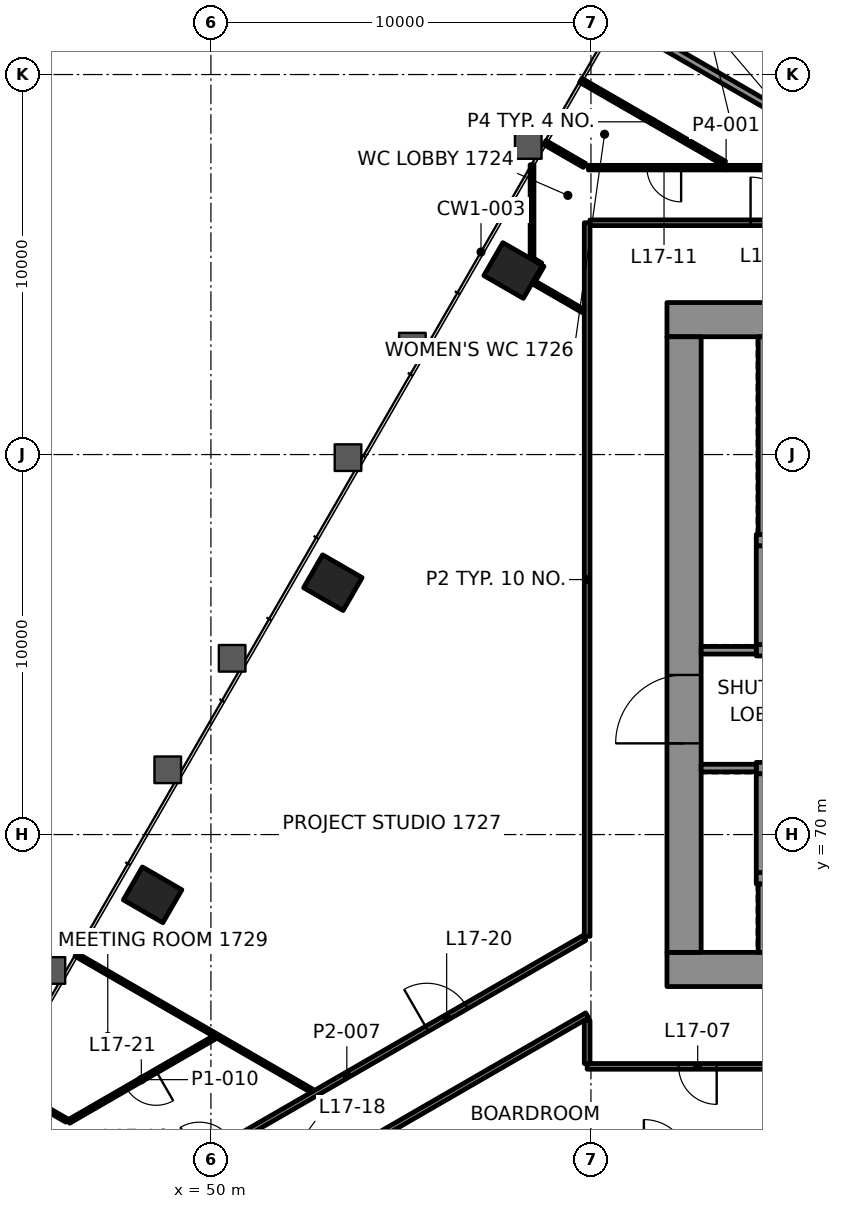
"""IFC4 building model, lengths in metres.
Left out: names, types, materials, properties, quantities, classifications, styles, units other than length and angle.
Written with IfcOpenShell. Run it as: python <this file> out.ifc"""

import sys

from ifc_helpers import new_model, si_unit, direction, frame, frame_2d, origin, origin_2d, place, context, subcontext, project, spatial, rectangle, extrude, element, fill, save


model = new_model("IFC4")
c1 = context("Model", 3, precision=1e-05, world=origin(), true_north=direction((0.0, 1.0)))
c2 = subcontext(c1, "Body", "Model", "MODEL_VIEW")
j1 = project(units=[si_unit("LENGTHUNIT", "METRE"), si_unit("PLANEANGLEUNIT", "RADIAN")], contexts=[c1])
p1 = place(None, origin())
s1 = spatial("IfcSite", under=j1, at=p1, CompositionType="ELEMENT")
p2 = place(p1, origin())
s2 = spatial("IfcBuilding", under=s1, at=p2, CompositionType="ELEMENT")
p3 = place(p2, frame((0.0, 0.0, 77.8)))
s3 = spatial("IfcBuildingStorey", under=s2, at=p3, CompositionType="ELEMENT", Elevation=77.8)
for number, where, z_axis, x_axis in (
    (1, (57.951, 84.843, -0.0), (0.0, 0.0, 1.0), (-0.5, -0.866, 0.0)),
    (2, (53.209, 76.628, -0.0), (0.0, 0.0, 1.0), (-0.5, -0.866, 0.0)),
    (3, (48.466, 68.414, -0.0), (0.0, 0.0, 1.0), (-0.5, -0.866, 0.0)),
):
    element("IfcColumn", number, at=place(p3, frame(where, z_axis=z_axis, x_axis=x_axis)), inside=s3, PredefinedType="COLUMN", context=c2, shape_type="SweptSolid", body=[
        extrude(rectangle(XDim=1.0, YDim=1.2, at=origin_2d()), origin(), (0.0, 0.0, 1.0), 4.2),
    ])
p4 = place(p3, frame((62.0, 66.45, 0.0), z_axis=(0.0, 0.0, 1.0), x_axis=(1.0, 0.0, 0.0)))
e4 = element("IfcWall", 4, at=p4, inside=s3, PredefinedType="SHEAR", context=c2, shape_type="SweptSolid", body=[
    extrude(rectangle(XDim=26.0, YDim=0.9, at=frame_2d((13.0, 0.0))), origin(), (0.0, 0.0, 1.0), 4.0),
])
p5 = place(p4, frame((3.45, 0.0, 0.0)))
e5 = element("IfcOpeningElement", 5, at=p5, cuts=e4, PredefinedType="OPENING", context=c2, shape_type="SweptSolid", body=[
    extrude(rectangle(XDim=0.9, YDim=2.1, at=frame_2d((0.45, 1.05))), frame((0.0, 0.46, 0.0), z_axis=(0.0, -1.0, 0.0), x_axis=(1.0, 0.0, 0.0)), (0.0, 0.0, 1.0), 0.92),
])
p6 = place(p4, frame((5.637, 0.0, 0.0)))
e6 = element("IfcOpeningElement", 6, at=p6, cuts=e4, PredefinedType="OPENING", context=c2, shape_type="SweptSolid", body=[
    extrude(rectangle(XDim=0.9, YDim=2.1, at=frame_2d((0.45, 1.05))), frame((0.0, 0.46, 0.0), z_axis=(0.0, -1.0, 0.0), x_axis=(1.0, 0.0, 0.0)), (0.0, 0.0, 1.0), 0.92),
])
p7 = place(p4, frame((7.212, 0.0, 0.0)))
e7 = element("IfcOpeningElement", 7, at=p7, cuts=e4, PredefinedType="OPENING", context=c2, shape_type="SweptSolid", body=[
    extrude(rectangle(XDim=0.9, YDim=2.1, at=frame_2d((0.45, 1.05))), frame((0.0, 0.46, 0.0), z_axis=(0.0, -1.0, 0.0), x_axis=(1.0, 0.0, 0.0)), (0.0, 0.0, 1.0), 0.92),
])
p8 = place(p4, frame((8.999, 0.0, 0.0)))
e8 = element("IfcOpeningElement", 8, at=p8, cuts=e4, PredefinedType="OPENING", context=c2, shape_type="SweptSolid", body=[
    extrude(rectangle(XDim=0.9, YDim=2.1, at=frame_2d((0.45, 1.05))), frame((0.0, 0.46, 0.0), z_axis=(0.0, -1.0, 0.0), x_axis=(1.0, 0.0, 0.0)), (0.0, 0.0, 1.0), 0.92),
])
p9 = place(p4, frame((17.324, 0.0, 0.0)))
e9 = element("IfcOpeningElement", 9, at=p9, cuts=e4, PredefinedType="OPENING", context=c2, shape_type="SweptSolid", body=[
    extrude(rectangle(XDim=0.9, YDim=2.1, at=frame_2d((0.45, 1.05))), frame((0.0, 0.46, 0.0), z_axis=(0.0, -1.0, 0.0), x_axis=(1.0, 0.0, 0.0)), (0.0, 0.0, 1.0), 0.92),
])
p10 = place(p3, frame((62.0, 83.55, 0.0), z_axis=(0.0, 0.0, 1.0), x_axis=(1.0, 0.0, 0.0)))
e10 = element("IfcWall", 10, at=p10, inside=s3, PredefinedType="SHEAR", context=c2, shape_type="SweptSolid", body=[
    extrude(rectangle(XDim=26.0, YDim=0.9, at=frame_2d((13.0, 0.0))), origin(), (0.0, 0.0, 1.0), 4.0),
])
p11 = place(p10, frame((5.695, 0.0, 0.0)))
e11 = element("IfcOpeningElement", 11, at=p11, cuts=e10, PredefinedType="OPENING", context=c2, shape_type="SweptSolid", body=[
    extrude(rectangle(XDim=1.0, YDim=2.1, at=frame_2d((0.5, 1.05))), frame((0.0, 0.46, 0.0), z_axis=(0.0, -1.0, 0.0), x_axis=(1.0, 0.0, 0.0)), (0.0, 0.0, 1.0), 0.92),
])
p12 = place(p10, frame((19.505, 0.0, 0.0)))
e12 = element("IfcOpeningElement", 12, at=p12, cuts=e10, PredefinedType="OPENING", context=c2, shape_type="SweptSolid", body=[
    extrude(rectangle(XDim=1.0, YDim=2.1, at=frame_2d((0.5, 1.05))), frame((0.0, 0.46, 0.0), z_axis=(0.0, -1.0, 0.0), x_axis=(1.0, 0.0, 0.0)), (0.0, 0.0, 1.0), 0.92),
])
p13 = place(p10, frame((3.45, 0.0, 0.0)))
e13 = element("IfcOpeningElement", 13, at=p13, cuts=e10, PredefinedType="OPENING", context=c2, shape_type="SweptSolid", body=[
    extrude(rectangle(XDim=0.9, YDim=2.1, at=frame_2d((0.45, 1.05))), frame((0.0, 0.46, 0.0), z_axis=(0.0, -1.0, 0.0), x_axis=(1.0, 0.0, 0.0)), (0.0, 0.0, 1.0), 0.92),
])
p14 = place(p10, frame((12.65, 0.0, 0.0)))
e14 = element("IfcOpeningElement", 14, at=p14, cuts=e10, PredefinedType="OPENING", context=c2, shape_type="SweptSolid", body=[
    extrude(rectangle(XDim=0.9, YDim=2.1, at=frame_2d((0.45, 1.05))), frame((0.0, 0.46, 0.0), z_axis=(0.0, -1.0, 0.0), x_axis=(1.0, 0.0, 0.0)), (0.0, 0.0, 1.0), 0.92),
])
p15 = place(p10, frame((22.55, 0.0, 0.0)))
e15 = element("IfcOpeningElement", 15, at=p15, cuts=e10, PredefinedType="OPENING", context=c2, shape_type="SweptSolid", body=[
    extrude(rectangle(XDim=0.9, YDim=2.1, at=frame_2d((0.45, 1.05))), frame((0.0, 0.46, 0.0), z_axis=(0.0, -1.0, 0.0), x_axis=(1.0, 0.0, 0.0)), (0.0, 0.0, 1.0), 0.92),
])
p16 = place(p3, frame((62.45, 66.9, 0.0), z_axis=(0.0, 0.0, 1.0), x_axis=(0.0, 1.0, 0.0)))
e16 = element("IfcWall", 16, at=p16, inside=s3, PredefinedType="SHEAR", context=c2, shape_type="SweptSolid", body=[
    extrude(rectangle(XDim=16.2, YDim=0.9, at=frame_2d((8.1, 0.0))), origin(), (0.0, 0.0, 1.0), 4.0),
])
p17 = place(p16, frame((5.5, 0.0, 0.0)))
e17 = element("IfcOpeningElement", 17, at=p17, cuts=e16, PredefinedType="OPENING", context=c2, shape_type="SweptSolid", body=[
    extrude(rectangle(XDim=1.8, YDim=2.1, at=frame_2d((0.9, 1.05))), frame((0.0, 0.46, 0.0), z_axis=(0.0, -1.0, 0.0), x_axis=(1.0, 0.0, 0.0)), (0.0, 0.0, 1.0), 0.92),
])
for number, where, z_axis, x_axis in (
    (18, (64.35, 68.85, 0.0), (0.0, 0.0, 1.0), (1.0, 0.0, 0.0)),
    (19, (64.35, 71.75, 0.0), (0.0, 0.0, 1.0), (1.0, 0.0, 0.0)),
    (20, (64.35, 74.85, 0.0), (0.0, 0.0, 1.0), (1.0, 0.0, 0.0)),
):
    element("IfcWall", number, at=place(p3, frame(where, z_axis=z_axis, x_axis=x_axis)), inside=s3, PredefinedType="SHEAR", context=c2, shape_type="SweptSolid", body=[
        extrude(rectangle(XDim=3.1, YDim=0.3, at=frame_2d((1.55, 0.0))), origin(), (0.0, 0.0, 1.0), 4.0),
    ])
for number, where, z_axis, x_axis in (
    (21, (64.5, 69.0, 0.0), (0.0, 0.0, 1.0), (0.0, 1.0, 0.0)),
    (22, (64.5, 75.0, 0.0), (0.0, 0.0, 1.0), (0.0, 1.0, 0.0)),
):
    element("IfcWall", number, at=place(p3, frame(where, z_axis=z_axis, x_axis=x_axis)), inside=s3, PredefinedType="SHEAR", context=c2, shape_type="SweptSolid", body=[
        extrude(rectangle(XDim=2.6, YDim=0.3, at=frame_2d((1.3, 0.0))), origin(), (0.0, 0.0, 1.0), 4.0),
    ])
p18 = place(p3, frame((64.35, 77.75, 0.0), z_axis=(0.0, 0.0, 1.0), x_axis=(1.0, 0.0, 0.0)))
e23 = element("IfcWall", 23, at=p18, inside=s3, PredefinedType="SHEAR", context=c2, shape_type="SweptSolid", body=[
    extrude(rectangle(XDim=22.75, YDim=0.3, at=frame_2d((11.375, 0.0))), origin(), (0.0, 0.0, 1.0), 4.0),
])
p19 = place(p18, frame((3.345, 0.0, 0.0)))
e24 = element("IfcOpeningElement", 24, at=p19, cuts=e23, PredefinedType="OPENING", context=c2, shape_type="SweptSolid", body=[
    extrude(rectangle(XDim=1.0, YDim=2.1, at=frame_2d((0.5, 1.05))), frame((0.0, 0.16, 0.0), z_axis=(0.0, -1.0, 0.0), x_axis=(1.0, 0.0, 0.0)), (0.0, 0.0, 1.0), 0.32),
])
p20 = place(p3, frame((90.099, 63.9, 0.0), z_axis=(0.0, 0.0, 1.0), x_axis=(-1.0, 0.0, 0.0)))
e25 = element("IfcWall", 25, at=p20, inside=s3, PredefinedType="PARTITIONING", context=c2, shape_type="SweptSolid", body=[
    extrude(rectangle(XDim=30.199, YDim=0.15, at=frame_2d((15.1, 0.0))), origin(), (0.0, 0.0, 1.0), 3.4),
])
p21 = place(p20, frame((2.309, 0.0, 0.0)))
e26 = element("IfcOpeningElement", 26, at=p21, cuts=e25, PredefinedType="OPENING", context=c2, shape_type="SweptSolid", body=[
    extrude(rectangle(XDim=1.2, YDim=2.1, at=frame_2d((0.6, 1.05))), frame((0.0, 0.085, 0.0), z_axis=(0.0, -1.0, 0.0), x_axis=(1.0, 0.0, 0.0)), (0.0, 0.0, 1.0), 0.17),
])
p22 = place(p20, frame((14.599, 0.0, 0.0)))
e27 = element("IfcOpeningElement", 27, at=p22, cuts=e25, PredefinedType="OPENING", context=c2, shape_type="SweptSolid", body=[
    extrude(rectangle(XDim=1.0, YDim=2.1, at=frame_2d((0.5, 1.05))), frame((0.0, 0.085, 0.0), z_axis=(0.0, -1.0, 0.0), x_axis=(1.0, 0.0, 0.0)), (0.0, 0.0, 1.0), 0.17),
])
p23 = place(p20, frame((26.791, 0.0, 0.0)))
e28 = element("IfcOpeningElement", 28, at=p23, cuts=e25, PredefinedType="OPENING", context=c2, shape_type="SweptSolid", body=[
    extrude(rectangle(XDim=1.0, YDim=2.1, at=frame_2d((0.5, 1.05))), frame((0.0, 0.085, 0.0), z_axis=(0.0, -1.0, 0.0), x_axis=(1.0, 0.0, 0.0)), (0.0, 0.0, 1.0), 0.17),
])
p24 = place(p3, frame((59.976, 86.1, 0.0), z_axis=(0.0, 0.0, 1.0), x_axis=(1.0, 0.0, 0.0)))
e29 = element("IfcWall", 29, at=p24, inside=s3, PredefinedType="PARTITIONING", context=c2, shape_type="SweptSolid", body=[
    extrude(rectangle(XDim=9.649, YDim=0.15, at=frame_2d((4.825, 0.0))), origin(), (0.0, 0.0, 1.0), 3.4),
])
p25 = place(p24, frame((4.225, 0.0, 0.0)))
e30 = element("IfcOpeningElement", 30, at=p25, cuts=e29, PredefinedType="OPENING", context=c2, shape_type="SweptSolid", body=[
    extrude(rectangle(XDim=1.2, YDim=2.1, at=frame_2d((0.6, 1.05))), frame((0.0, 0.085, 0.0), z_axis=(0.0, -1.0, 0.0), x_axis=(1.0, 0.0, 0.0)), (0.0, 0.0, 1.0), 0.17),
])
p26 = place(p3, frame((67.181, 87.55, 0.0), z_axis=(0.0, 0.0, 1.0), x_axis=(-1.0, 0.0, 0.0)))
e31 = element("IfcWall", 31, at=p26, inside=s3, PredefinedType="PARTITIONING", context=c2, shape_type="SweptSolid", body=[
    extrude(rectangle(XDim=7.249, YDim=0.12, at=frame_2d((3.625, 0.0))), origin(), (0.0, 0.0, 1.0), 3.4),
])
p27 = place(p26, frame((1.388, 0.0, 0.0)))
e32 = element("IfcOpeningElement", 32, at=p27, cuts=e31, PredefinedType="OPENING", context=c2, shape_type="SweptSolid", body=[
    extrude(rectangle(XDim=0.9, YDim=2.1, at=frame_2d((0.45, 1.05))), frame((0.0, 0.07, 0.0), z_axis=(0.0, -1.0, 0.0), x_axis=(1.0, 0.0, 0.0)), (0.0, 0.0, 1.0), 0.14),
])
p28 = place(p26, frame((4.807, 0.0, 0.0)))
e33 = element("IfcOpeningElement", 33, at=p28, cuts=e31, PredefinedType="OPENING", context=c2, shape_type="SweptSolid", body=[
    extrude(rectangle(XDim=0.9, YDim=2.1, at=frame_2d((0.45, 1.05))), frame((0.0, 0.07, 0.0), z_axis=(0.0, -1.0, 0.0), x_axis=(1.0, 0.0, 0.0)), (0.0, 0.0, 1.0), 0.14),
])
p29 = place(p3, frame((59.9, 65.243, 0.0), z_axis=(0.0, 0.0, 1.0), x_axis=(-0.866023326939, -0.500003597184, 0.0)))
e34 = element("IfcWall", 34, at=p29, inside=s3, PredefinedType="PARTITIONING", context=c2, shape_type="SweptSolid", body=[
    extrude(rectangle(XDim=13.48, YDim=0.15, at=frame_2d((6.74, 0.0))), origin(), (0.0, 0.0, 1.0), 3.247),
])
p30 = place(p29, frame((9.643, 0.0, 0.0)))
e35 = element("IfcOpeningElement", 35, at=p30, cuts=e34, PredefinedType="OPENING", context=c2, shape_type="SweptSolid", body=[
    extrude(rectangle(XDim=1.2, YDim=2.1, at=frame_2d((0.6, 1.05))), frame((0.0, 0.085, 0.0), z_axis=(0.0, -1.0, 0.0), x_axis=(1.0, 0.0, 0.0)), (0.0, 0.0, 1.0), 0.17),
])
p31 = place(p3, frame((47.328, 60.063, 0.0), z_axis=(0.0, 0.0, 1.0), x_axis=(0.86602527873, 0.500000216601, 0.0)))
e36 = element("IfcWall", 36, at=p31, inside=s3, PredefinedType="PARTITIONING", context=c2, shape_type="SweptSolid", body=[
    extrude(rectangle(XDim=14.431, YDim=0.15, at=frame_2d((7.215, 0.0))), origin(), (0.0, 0.0, 1.0), 3.4),
])
p32 = place(p31, frame((2.737, 0.0, 0.0)))
e37 = element("IfcOpeningElement", 37, at=p32, cuts=e36, PredefinedType="OPENING", context=c2, shape_type="SweptSolid", body=[
    extrude(rectangle(XDim=1.0, YDim=2.1, at=frame_2d((0.5, 1.05))), frame((0.0, 0.085, 0.0), z_axis=(0.0, -1.0, 0.0), x_axis=(1.0, 0.0, 0.0)), (0.0, 0.0, 1.0), 0.17),
])
p33 = place(p31, frame((9.649, 0.0, 0.0)))
e38 = element("IfcOpeningElement", 38, at=p33, cuts=e36, PredefinedType="OPENING", context=c2, shape_type="SweptSolid", body=[
    extrude(rectangle(XDim=1.2, YDim=2.1, at=frame_2d((0.6, 1.05))), frame((0.0, 0.085, 0.0), z_axis=(0.0, -1.0, 0.0), x_axis=(1.0, 0.0, 0.0)), (0.0, 0.0, 1.0), 0.17),
])
p34 = place(p3, frame((50.082, 64.655, 0.0), z_axis=(0.0, 0.0, 1.0), x_axis=(-0.866030989016, -0.499990325971, 0.0)))
e39 = element("IfcWall", 39, at=p34, inside=s3, PredefinedType="PARTITIONING", context=c2, shape_type="SweptSolid", body=[
    extrude(rectangle(XDim=4.418, YDim=0.1, at=frame_2d((2.209, 0.0))), origin(), (0.0, 0.0, 1.0), 3.4),
])
p35 = place(p34, frame((1.759, 0.0, 0.0)))
e40 = element("IfcOpeningElement", 40, at=p35, cuts=e39, PredefinedType="OPENING", context=c2, shape_type="SweptSolid", body=[
    extrude(rectangle(XDim=0.9, YDim=2.1, at=frame_2d((0.45, 1.05))), frame((0.0, 0.06, 0.0), z_axis=(0.0, -1.0, 0.0), x_axis=(1.0, 0.0, 0.0)), (0.0, 0.0, 1.0), 0.12),
])
p36 = place(p3, frame((58.496, 84.587, 0.0), z_axis=(0.0, 0.0, 1.0), x_axis=(0.500114568548, 0.865959247497, 0.0)))
e41 = element("IfcWall", 41, at=p36, inside=s3, PredefinedType="PARTITIONING", context=c2, shape_type="SweptSolid", body=[
    extrude(rectangle(XDim=0.449, YDim=0.1, at=frame_2d((0.225, 0.0))), origin(), (0.0, 0.0, 1.0), 3.4),
])
p37 = place(p3, frame((59.9, 63.975, 0.0), z_axis=(0.0, 0.0, 1.0), x_axis=(0.0, 1.0, 0.0)))
e42 = element("IfcWall", 42, at=p37, inside=s3, PredefinedType="PARTITIONING", context=c2, shape_type="SweptSolid", body=[
    extrude(rectangle(XDim=1.131, YDim=0.15, at=frame_2d((0.565, 0.0))), origin(), (0.0, 0.0, 1.0), 3.247),
])
p38 = place(p3, frame((59.9, 67.321, 0.0), z_axis=(0.0, 0.0, 1.0), x_axis=(0.0, 1.0, 0.0)))
e43 = element("IfcWall", 43, at=p38, inside=s3, PredefinedType="PARTITIONING", context=c2, shape_type="SweptSolid", body=[
    extrude(rectangle(XDim=18.778, YDim=0.15, at=frame_2d((9.389, 0.0))), origin(), (0.0, 0.0, 1.0), 3.4),
])
p39 = place(p3, frame((58.45, 85.133, 0.0), z_axis=(0.0, 0.0, 1.0), x_axis=(0.0, 1.0, 0.0)))
e44 = element("IfcWall", 44, at=p39, inside=s3, PredefinedType="PARTITIONING", context=c2, shape_type="SweptSolid", body=[
    extrude(rectangle(XDim=2.494, YDim=0.1, at=frame_2d((1.247, 0.0))), origin(), (0.0, 0.0, 1.0), 3.165),
])
p40 = place(p3, frame((69.573, 86.348, 0.0), z_axis=(0.0, 0.0, 1.0), x_axis=(-0.866024495625, 0.500001572974, 0.0)))
e45 = element("IfcWall", 45, at=p40, inside=s3, PredefinedType="PARTITIONING", context=c2, shape_type="SweptSolid", body=[
    extrude(rectangle(XDim=10.272, YDim=0.2, at=frame_2d((5.136, 0.0))), origin(), (0.0, 0.0, 1.0), 3.165),
])
p41 = place(p3, frame((63.512, 87.665, 0.0), z_axis=(0.0, 0.0, 1.0), x_axis=(-0.866014185868, 0.500019429497, 0.0)))
e46 = element("IfcWall", 46, at=p41, inside=s3, PredefinedType="PARTITIONING", context=c2, shape_type="SweptSolid", body=[
    extrude(rectangle(XDim=4.365, YDim=0.12, at=frame_2d((2.182, 0.0))), origin(), (0.0, 0.0, 1.0), 3.165),
])
p42 = place(p3, frame((59.828, 87.61, 0.0), z_axis=(0.0, 0.0, 1.0), x_axis=(-0.865996090227, 0.500050769134, 0.0)))
e47 = element("IfcWall", 47, at=p42, inside=s3, PredefinedType="PARTITIONING", context=c2, shape_type="SweptSolid", body=[
    extrude(rectangle(XDim=1.202, YDim=0.12, at=frame_2d((0.601, 0.0))), origin(), (0.0, 0.0, 1.0), 3.165),
])
p43 = place(p3, frame((58.677, 85.001, 0.0), z_axis=(0.0, 0.0, 1.0), x_axis=(-0.86610613113, 0.49986015006, 0.0)))
e48 = element("IfcWall", 48, at=p43, inside=s3, PredefinedType="PARTITIONING", context=c2, shape_type="SweptSolid", body=[
    extrude(rectangle(XDim=0.205, YDim=0.1, at=frame_2d((0.102, 0.0))), origin(), (0.0, 0.0, 1.0), 3.4),
])
p44 = place(p3, frame((59.799, 83.776, 0.0), z_axis=(0.0, 0.0, 1.0), x_axis=(-0.866029087811, 0.499993619025, 0.0)))
e49 = element("IfcWall", 49, at=p44, inside=s3, PredefinedType="PARTITIONING", context=c2, shape_type="SweptSolid", body=[
    extrude(rectangle(XDim=1.533, YDim=0.1, at=frame_2d((0.766, 0.0))), origin(), (0.0, 0.0, 1.0), 3.4),
])
p45 = place(p3, frame((52.657, 63.256, 0.0), z_axis=(0.0, 0.0, 1.0), x_axis=(-0.866014863173, 0.50001825643, 0.0)))
e50 = element("IfcWall", 50, at=p45, inside=s3, PredefinedType="PARTITIONING", context=c2, shape_type="SweptSolid", body=[
    extrude(rectangle(XDim=7.168, YDim=0.1, at=frame_2d((3.584, 0.0))), origin(), (0.0, 0.0, 1.0), 3.4),
])
p46 = place(p3, frame((46.206, 62.475, 0.0), z_axis=(0.0, 0.0, 1.0), x_axis=(-0.866033041146, 0.499986771468, 0.0)))
e51 = element("IfcWall", 51, at=p46, inside=s3, PredefinedType="PARTITIONING", context=c2, shape_type="SweptSolid", body=[
    extrude(rectangle(XDim=1.972, YDim=0.1, at=frame_2d((0.986, 0.0))), origin(), (0.0, 0.0, 1.0), 3.4),
])
for number, where, z_axis, x_axis in (
    (52, (62.9, 71.75, 0.0), (0.0, 0.0, 1.0), (1.0, 0.0, 0.0)),
    (53, (62.9, 74.85, 0.0), (0.0, 0.0, 1.0), (1.0, 0.0, 0.0)),
):
    element("IfcWall", number, at=place(p3, frame(where, z_axis=z_axis, x_axis=x_axis)), inside=s3, PredefinedType="PARTITIONING", context=c2, shape_type="SweptSolid", body=[
        extrude(rectangle(XDim=1.45, YDim=0.2, at=frame_2d((0.725, 0.0))), origin(), (0.0, 0.0, 1.0), 4.0),
    ])
p47 = place(p3, frame((64.5, 66.9, 0.0), z_axis=(0.0, 0.0, 1.0), x_axis=(0.0, 1.0, 0.0)))
e54 = element("IfcWall", 54, at=p47, inside=s3, PredefinedType="PARTITIONING", context=c2, shape_type="SweptSolid", body=[
    extrude(rectangle(XDim=1.8, YDim=0.2, at=frame_2d((0.9, 0.0))), origin(), (0.0, 0.0, 1.0), 4.0),
])
p48 = place(p3, frame((64.5, 77.9, 0.0), z_axis=(0.0, 0.0, 1.0), x_axis=(0.0, 1.0, 0.0)))
e55 = element("IfcWall", 55, at=p48, inside=s3, PredefinedType="PARTITIONING", context=c2, shape_type="SweptSolid", body=[
    extrude(rectangle(XDim=5.2, YDim=0.2, at=frame_2d((2.6, 0.0))), origin(), (0.0, 0.0, 1.0), 4.0),
])
p49 = place(p23, origin())
e56 = element("IfcDoor", 56, at=p49, inside=s3, OperationType="SINGLE_SWING_LEFT", PredefinedType="DOOR", context=c2, shape_type="SweptSolid", body=[
    extrude(rectangle(XDim=1.0, YDim=2.1, at=frame_2d((0.5, 1.05))), frame((0.0, 0.025, 0.0), z_axis=(0.0, -1.0, 0.0), x_axis=(1.0, 0.0, 0.0)), (0.0, 0.0, 1.0), 0.05),
])
fill(e28, e56)
p50 = place(p25, origin())
e57 = element("IfcDoor", 57, at=p50, inside=s3, OperationType="DOUBLE_DOOR_SINGLE_SWING", PredefinedType="DOOR", context=c2, shape_type="SweptSolid", body=[
    extrude(rectangle(XDim=1.2, YDim=2.1, at=frame_2d((0.6, 1.05))), frame((0.0, 0.025, 0.0), z_axis=(0.0, -1.0, 0.0), x_axis=(1.0, 0.0, 0.0)), (0.0, 0.0, 1.0), 0.05),
])
fill(e30, e57)
p51 = place(p28, origin())
e58 = element("IfcDoor", 58, at=p51, inside=s3, OperationType="SINGLE_SWING_RIGHT", PredefinedType="DOOR", context=c2, shape_type="SweptSolid", body=[
    extrude(rectangle(XDim=0.9, YDim=2.1, at=frame_2d((0.45, 1.05))), frame((0.0, 0.025, 0.0), z_axis=(0.0, -1.0, 0.0), x_axis=(1.0, 0.0, 0.0)), (0.0, 0.0, 1.0), 0.05),
])
fill(e33, e58)
p52 = place(p33, origin())
e59 = element("IfcDoor", 59, at=p52, inside=s3, OperationType="DOUBLE_DOOR_SINGLE_SWING", PredefinedType="DOOR", context=c2, shape_type="SweptSolid", body=[
    extrude(rectangle(XDim=1.2, YDim=2.1, at=frame_2d((0.6, 1.05))), frame((0.0, 0.025, 0.0), z_axis=(0.0, -1.0, 0.0), x_axis=(1.0, 0.0, 0.0)), (0.0, 0.0, 1.0), 0.05),
])
fill(e38, e59)
p53 = place(p35, origin())
e60 = element("IfcDoor", 60, at=p53, inside=s3, OperationType="SINGLE_SWING_LEFT", PredefinedType="DOOR", context=c2, shape_type="SweptSolid", body=[
    extrude(rectangle(XDim=0.9, YDim=2.1, at=frame_2d((0.45, 1.05))), frame((0.0, 0.025, 0.0), z_axis=(0.0, -1.0, 0.0), x_axis=(1.0, 0.0, 0.0)), (0.0, 0.0, 1.0), 0.05),
])
fill(e40, e60)
p54 = place(p17, origin())
e61 = element("IfcDoor", 61, at=p54, inside=s3, OperationType="SINGLE_SWING_LEFT", PredefinedType="DOOR", context=c2, shape_type="SweptSolid", body=[
    extrude(rectangle(XDim=1.8, YDim=2.1, at=frame_2d((0.9, 1.05))), frame((0.0, 0.17, 0.0), z_axis=(0.0, -1.0, 0.0), x_axis=(1.0, 0.0, 0.0)), (0.0, 0.0, 1.0), 0.34),
])
fill(e17, e61)
save(model, sys.argv[1])
